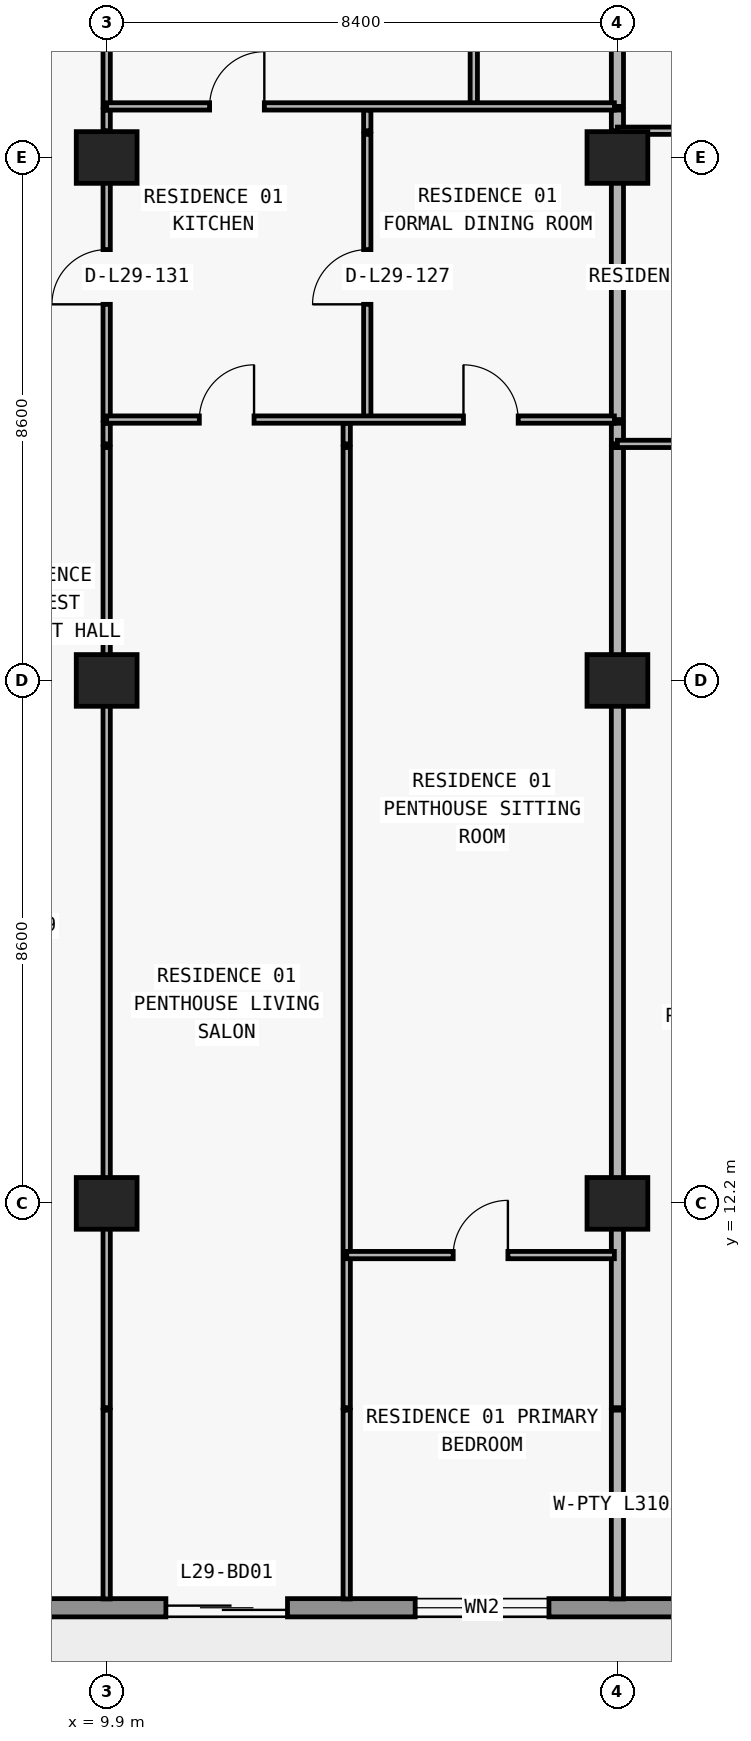
"""IFC4 building model, lengths in metres.
Left out: names, types, materials, properties, quantities, classifications, styles, units other than length and angle.
Written with IfcOpenShell. Run it as: python <this file> out.ifc"""

import sys

from ifc_helpers import new_model, si_unit, direction, frame, frame_2d, origin, origin_2d, place, context, subcontext, project, spatial, rectangle, extrude, element, fill, save


model = new_model("IFC4")
c1 = context("Model", 3, precision=1e-05, world=origin(), true_north=direction((0.0, 1.0)))
c2 = subcontext(c1, "Body", "Model", "MODEL_VIEW")
j1 = project(units=[si_unit("LENGTHUNIT", "METRE"), si_unit("PLANEANGLEUNIT", "RADIAN")], contexts=[c1])
p1 = place(None, origin())
s1 = spatial("IfcSite", under=j1, at=p1, CompositionType="ELEMENT")
p2 = place(p1, origin())
s2 = spatial("IfcBuilding", under=s1, at=p2, CompositionType="ELEMENT")
p3 = place(p2, frame((0.0, 0.0, 109.2)))
s3 = spatial("IfcBuildingStorey", under=s2, at=p3, CompositionType="ELEMENT", Elevation=109.2)
for number, where, z_axis, x_axis in (
    (1, (9.9, 12.2, 0.0), (0.0, 0.0, 1.0), (1.0, 0.0, 0.0)),
    (2, (18.3, 12.2, 0.0), (0.0, 0.0, 1.0), (1.0, 0.0, 0.0)),
    (3, (9.9, 20.8, 0.0), (0.0, 0.0, 1.0), (1.0, 0.0, 0.0)),
    (4, (18.3, 20.8, 0.0), (0.0, 0.0, 1.0), (1.0, 0.0, 0.0)),
    (5, (9.9, 29.4, 0.0), (0.0, 0.0, 1.0), (1.0, 0.0, 0.0)),
    (6, (18.3, 29.4, 0.0), (0.0, 0.0, 1.0), (1.0, 0.0, 0.0)),
):
    element("IfcColumn", number, at=place(p3, frame(where, z_axis=z_axis, x_axis=x_axis)), inside=s3, PredefinedType="COLUMN", context=c2, shape_type="SweptSolid", body=[
        extrude(rectangle(XDim=1.0, YDim=0.85, at=origin_2d()), origin(), (0.0, 0.0, 1.0), 3.05),
    ])
p4 = place(p3, frame((70.1, 5.55, 0.0), z_axis=(0.0, 0.0, 1.0), x_axis=(-1.0, 0.0, 0.0)))
e7 = element("IfcWall", 7, at=p4, inside=s3, PredefinedType="STANDARD", context=c2, shape_type="SweptSolid", body=[
    extrude(rectangle(XDim=62.4, YDim=0.3, at=frame_2d((31.2, 0.0))), origin(), (0.0, 0.0, 1.0), 3.05),
])
p5 = place(p4, frame((57.226, 0.0, 0.0)))
e8 = element("IfcOpeningElement", 8, at=p5, cuts=e7, PredefinedType="OPENING", context=c2, shape_type="SweptSolid", body=[
    extrude(rectangle(XDim=2.0, YDim=2.3, at=frame_2d((1.0, 1.15))), frame((0.0, 0.16, 0.0), z_axis=(0.0, -1.0, 0.0), x_axis=(1.0, 0.0, 0.0)), (0.0, 0.0, 1.0), 0.32),
])
p6 = place(p4, frame((52.926, 0.0, 0.85)))
e9 = element("IfcOpeningElement", 9, at=p6, cuts=e7, PredefinedType="OPENING", context=c2, shape_type="SweptSolid", body=[
    extrude(rectangle(XDim=2.2, YDim=1.55, at=frame_2d((1.1, 0.775))), frame((0.0, 0.16, 0.0), z_axis=(0.0, -1.0, 0.0), x_axis=(1.0, 0.0, 0.0)), (0.0, 0.0, 1.0), 0.32),
])
p7 = place(p4, frame((48.49, 0.0, 0.0)))
e10 = element("IfcOpeningElement", 10, at=p7, cuts=e7, PredefinedType="OPENING", context=c2, shape_type="SweptSolid", body=[
    extrude(rectangle(XDim=2.0, YDim=2.3, at=frame_2d((1.0, 1.15))), frame((0.0, 0.16, 0.0), z_axis=(0.0, -1.0, 0.0), x_axis=(1.0, 0.0, 0.0)), (0.0, 0.0, 1.0), 0.32),
])
p8 = place(p4, frame((44.39, 0.0, 0.85)))
e11 = element("IfcOpeningElement", 11, at=p8, cuts=e7, PredefinedType="OPENING", context=c2, shape_type="SweptSolid", body=[
    extrude(rectangle(XDim=1.8, YDim=1.55, at=frame_2d((0.9, 0.775))), frame((0.0, 0.16, 0.0), z_axis=(0.0, -1.0, 0.0), x_axis=(1.0, 0.0, 0.0)), (0.0, 0.0, 1.0), 0.32),
])
p9 = place(p4, frame((40.49, 0.0, 0.0)))
e12 = element("IfcOpeningElement", 12, at=p9, cuts=e7, PredefinedType="OPENING", context=c2, shape_type="SweptSolid", body=[
    extrude(rectangle(XDim=2.0, YDim=2.3, at=frame_2d((1.0, 1.15))), frame((0.0, 0.16, 0.0), z_axis=(0.0, -1.0, 0.0), x_axis=(1.0, 0.0, 0.0)), (0.0, 0.0, 1.0), 0.32),
])
p10 = place(p4, frame((35.81, 0.0, 0.65)))
e13 = element("IfcOpeningElement", 13, at=p10, cuts=e7, PredefinedType="OPENING", context=c2, shape_type="SweptSolid", body=[
    extrude(rectangle(XDim=2.6, YDim=1.85, at=frame_2d((1.3, 0.925))), frame((0.0, 0.16, 0.0), z_axis=(0.0, -1.0, 0.0), x_axis=(1.0, 0.0, 0.0)), (0.0, 0.0, 1.0), 0.32),
])
p11 = place(p4, frame((30.1, 0.0, 0.85)))
e14 = element("IfcOpeningElement", 14, at=p11, cuts=e7, PredefinedType="OPENING", context=c2, shape_type="SweptSolid", body=[
    extrude(rectangle(XDim=2.2, YDim=1.55, at=frame_2d((1.1, 0.775))), frame((0.0, 0.16, 0.0), z_axis=(0.0, -1.0, 0.0), x_axis=(1.0, 0.0, 0.0)), (0.0, 0.0, 1.0), 0.32),
])
p12 = place(p4, frame((22.1, 0.0, 0.85)))
e15 = element("IfcOpeningElement", 15, at=p12, cuts=e7, PredefinedType="OPENING", context=c2, shape_type="SweptSolid", body=[
    extrude(rectangle(XDim=2.2, YDim=1.55, at=frame_2d((1.1, 0.775))), frame((0.0, 0.16, 0.0), z_axis=(0.0, -1.0, 0.0), x_axis=(1.0, 0.0, 0.0)), (0.0, 0.0, 1.0), 0.32),
])
p13 = place(p4, frame((15.69, 0.0, 0.0)))
e16 = element("IfcOpeningElement", 16, at=p13, cuts=e7, PredefinedType="OPENING", context=c2, shape_type="SweptSolid", body=[
    extrude(rectangle(XDim=2.0, YDim=2.3, at=frame_2d((1.0, 1.15))), frame((0.0, 0.16, 0.0), z_axis=(0.0, -1.0, 0.0), x_axis=(1.0, 0.0, 0.0)), (0.0, 0.0, 1.0), 0.32),
])
p14 = place(p4, frame((11.59, 0.0, 0.85)))
e17 = element("IfcOpeningElement", 17, at=p14, cuts=e7, PredefinedType="OPENING", context=c2, shape_type="SweptSolid", body=[
    extrude(rectangle(XDim=1.8, YDim=1.55, at=frame_2d((0.9, 0.775))), frame((0.0, 0.16, 0.0), z_axis=(0.0, -1.0, 0.0), x_axis=(1.0, 0.0, 0.0)), (0.0, 0.0, 1.0), 0.32),
])
p15 = place(p4, frame((7.626, 0.0, 0.0)))
e18 = element("IfcOpeningElement", 18, at=p15, cuts=e7, PredefinedType="OPENING", context=c2, shape_type="SweptSolid", body=[
    extrude(rectangle(XDim=2.0, YDim=2.3, at=frame_2d((1.0, 1.15))), frame((0.0, 0.16, 0.0), z_axis=(0.0, -1.0, 0.0), x_axis=(1.0, 0.0, 0.0)), (0.0, 0.0, 1.0), 0.32),
])
p16 = place(p4, frame((3.326, 0.0, 0.85)))
e19 = element("IfcOpeningElement", 19, at=p16, cuts=e7, PredefinedType="OPENING", context=c2, shape_type="SweptSolid", body=[
    extrude(rectangle(XDim=2.2, YDim=1.55, at=frame_2d((1.1, 0.775))), frame((0.0, 0.16, 0.0), z_axis=(0.0, -1.0, 0.0), x_axis=(1.0, 0.0, 0.0)), (0.0, 0.0, 1.0), 0.32),
])
p17 = place(p3, frame((9.9, 5.695, 0.0), z_axis=(0.0, 0.0, 1.0), x_axis=(0.0, 1.0, 0.0)))
e20 = element("IfcWall", 20, at=p17, inside=s3, PredefinedType="PARTITIONING", context=c2, shape_type="SweptSolid", body=[
    extrude(rectangle(XDim=3.105, YDim=0.12, at=frame_2d((1.552, 0.0))), origin(), (0.0, 0.0, 1.0), 3.05),
])
p18 = place(p3, frame((9.9, 8.84, 0.0), z_axis=(0.0, 0.0, 1.0), x_axis=(0.0, 1.0, 0.0)))
e21 = element("IfcWall", 21, at=p18, inside=s3, PredefinedType="PARTITIONING", context=c2, shape_type="SweptSolid", body=[
    extrude(rectangle(XDim=15.79, YDim=0.12, at=frame_2d((7.895, 0.0))), origin(), (0.0, 0.0, 1.0), 2.174),
])
p19 = place(p3, frame((9.9, 24.69, 0.0), z_axis=(0.0, 0.0, 1.0), x_axis=(0.0, 1.0, 0.0)))
e22 = element("IfcWall", 22, at=p19, inside=s3, PredefinedType="PARTITIONING", context=c2, shape_type="SweptSolid", body=[
    extrude(rectangle(XDim=0.34, YDim=0.12, at=frame_2d((0.17, 0.0))), origin(), (0.0, 0.0, 1.0), 2.174),
])
p20 = place(p3, frame((9.9, 25.09, 0.0), z_axis=(0.0, 0.0, 1.0), x_axis=(0.0, 1.0, 0.0)))
e23 = element("IfcWall", 23, at=p20, inside=s3, PredefinedType="PARTITIONING", context=c2, shape_type="SweptSolid", body=[
    extrude(rectangle(XDim=4.69, YDim=0.12, at=frame_2d((2.345, 0.0))), origin(), (0.0, 0.0, 1.0), 2.174),
])
p21 = place(p20, frame((1.895, 0.0, 0.0)))
e24 = element("IfcOpeningElement", 24, at=p21, cuts=e23, PredefinedType="OPENING", context=c2, shape_type="SweptSolid", body=[
    extrude(rectangle(XDim=0.9, YDim=2.124, at=frame_2d((0.45, 1.062))), frame((0.0, 0.07, 0.0), z_axis=(0.0, -1.0, 0.0), x_axis=(1.0, 0.0, 0.0)), (0.0, 0.0, 1.0), 0.14),
])
p22 = place(p3, frame((9.9, 29.84, 0.0), z_axis=(0.0, 0.0, 1.0), x_axis=(0.0, 1.0, 0.0)))
e25 = element("IfcWall", 25, at=p22, inside=s3, PredefinedType="PARTITIONING", context=c2, shape_type="SweptSolid", body=[
    extrude(rectangle(XDim=0.34, YDim=0.12, at=frame_2d((0.17, 0.0))), origin(), (0.0, 0.0, 1.0), 2.174),
])
p23 = place(p3, frame((9.9, 30.24, 0.0), z_axis=(0.0, 0.0, 1.0), x_axis=(0.0, 1.0, 0.0)))
e26 = element("IfcWall", 26, at=p23, inside=s3, PredefinedType="PARTITIONING", context=c2, shape_type="SweptSolid", body=[
    extrude(rectangle(XDim=4.36, YDim=0.12, at=frame_2d((2.18, 0.0))), origin(), (0.0, 0.0, 1.0), 2.174),
])
p24 = place(p3, frame((13.848, 5.695, 0.0), z_axis=(0.0, 0.0, 1.0), x_axis=(0.0, 1.0, 0.0)))
e27 = element("IfcWall", 27, at=p24, inside=s3, PredefinedType="PARTITIONING", context=c2, shape_type="SweptSolid", body=[
    extrude(rectangle(XDim=3.105, YDim=0.12, at=frame_2d((1.552, 0.0))), origin(), (0.0, 0.0, 1.0), 3.05),
])
p25 = place(p3, frame((13.848, 8.84, 0.0), z_axis=(0.0, 0.0, 1.0), x_axis=(0.0, 1.0, 0.0)))
e28 = element("IfcWall", 28, at=p25, inside=s3, PredefinedType="PARTITIONING", context=c2, shape_type="SweptSolid", body=[
    extrude(rectangle(XDim=15.79, YDim=0.12, at=frame_2d((7.895, 0.0))), origin(), (0.0, 0.0, 1.0), 3.05),
])
p26 = place(p3, frame((13.848, 24.69, 0.0), z_axis=(0.0, 0.0, 1.0), x_axis=(0.0, 1.0, 0.0)))
e29 = element("IfcWall", 29, at=p26, inside=s3, PredefinedType="PARTITIONING", context=c2, shape_type="SweptSolid", body=[
    extrude(rectangle(XDim=0.34, YDim=0.12, at=frame_2d((0.17, 0.0))), origin(), (0.0, 0.0, 1.0), 3.05),
])
p27 = place(p3, frame((14.186, 25.09, 0.0), z_axis=(0.0, 0.0, 1.0), x_axis=(0.0, 1.0, 0.0)))
e30 = element("IfcWall", 30, at=p27, inside=s3, PredefinedType="PARTITIONING", context=c2, shape_type="SweptSolid", body=[
    extrude(rectangle(XDim=4.69, YDim=0.12, at=frame_2d((2.345, 0.0))), origin(), (0.0, 0.0, 1.0), 2.486),
])
p28 = place(p27, frame((1.895, 0.0, 0.0)))
e31 = element("IfcOpeningElement", 31, at=p28, cuts=e30, PredefinedType="OPENING", context=c2, shape_type="SweptSolid", body=[
    extrude(rectangle(XDim=0.9, YDim=2.15, at=frame_2d((0.45, 1.075))), frame((0.0, 0.07, 0.0), z_axis=(0.0, -1.0, 0.0), x_axis=(1.0, 0.0, 0.0)), (0.0, 0.0, 1.0), 0.14),
])
p29 = place(p3, frame((14.186, 29.84, 0.0), z_axis=(0.0, 0.0, 1.0), x_axis=(0.0, 1.0, 0.0)))
e32 = element("IfcWall", 32, at=p29, inside=s3, PredefinedType="PARTITIONING", context=c2, shape_type="SweptSolid", body=[
    extrude(rectangle(XDim=0.34, YDim=0.12, at=frame_2d((0.17, 0.0))), origin(), (0.0, 0.0, 1.0), 2.486),
])
p30 = place(p3, frame((15.938, 30.24, 0.0), z_axis=(0.0, 0.0, 1.0), x_axis=(0.0, 1.0, 0.0)))
e33 = element("IfcWall", 33, at=p30, inside=s3, PredefinedType="PARTITIONING", context=c2, shape_type="SweptSolid", body=[
    extrude(rectangle(XDim=4.36, YDim=0.12, at=frame_2d((2.18, 0.0))), origin(), (0.0, 0.0, 1.0), 3.05),
])
p31 = place(p30, frame((1.755, 0.0, 0.0)))
e34 = element("IfcOpeningElement", 34, at=p31, cuts=e33, PredefinedType="OPENING", context=c2, shape_type="SweptSolid", body=[
    extrude(rectangle(XDim=0.85, YDim=2.1, at=frame_2d((0.425, 1.05))), frame((0.0, 0.07, 0.0), z_axis=(0.0, -1.0, 0.0), x_axis=(1.0, 0.0, 0.0)), (0.0, 0.0, 1.0), 0.14),
])
p32 = place(p3, frame((18.3, 5.695, 0.0), z_axis=(0.0, 0.0, 1.0), x_axis=(0.0, 1.0, 0.0)))
e35 = element("IfcWall", 35, at=p32, inside=s3, PredefinedType="PARTITIONING", context=c2, shape_type="SweptSolid", body=[
    extrude(rectangle(XDim=3.105, YDim=0.2, at=frame_2d((1.552, 0.0))), origin(), (0.0, 0.0, 1.0), 3.05),
])
p33 = place(p3, frame((18.3, 8.84, 0.0), z_axis=(0.0, 0.0, 1.0), x_axis=(0.0, 1.0, 0.0)))
e36 = element("IfcWall", 36, at=p33, inside=s3, PredefinedType="PARTITIONING", context=c2, shape_type="SweptSolid", body=[
    extrude(rectangle(XDim=15.79, YDim=0.2, at=frame_2d((7.895, 0.0))), origin(), (0.0, 0.0, 1.0), 2.174),
])
p34 = place(p3, frame((18.3, 24.69, 0.0), z_axis=(0.0, 0.0, 1.0), x_axis=(0.0, 1.0, 0.0)))
e37 = element("IfcWall", 37, at=p34, inside=s3, PredefinedType="PARTITIONING", context=c2, shape_type="SweptSolid", body=[
    extrude(rectangle(XDim=0.34, YDim=0.2, at=frame_2d((0.17, 0.0))), origin(), (0.0, 0.0, 1.0), 2.174),
])
p35 = place(p3, frame((18.3, 25.09, 0.0), z_axis=(0.0, 0.0, 1.0), x_axis=(0.0, 1.0, 0.0)))
e38 = element("IfcWall", 38, at=p35, inside=s3, PredefinedType="PARTITIONING", context=c2, shape_type="SweptSolid", body=[
    extrude(rectangle(XDim=4.69, YDim=0.2, at=frame_2d((2.345, 0.0))), origin(), (0.0, 0.0, 1.0), 2.174),
])
p36 = place(p3, frame((18.3, 29.84, 0.0), z_axis=(0.0, 0.0, 1.0), x_axis=(0.0, 1.0, 0.0)))
e39 = element("IfcWall", 39, at=p36, inside=s3, PredefinedType="PARTITIONING", context=c2, shape_type="SweptSolid", body=[
    extrude(rectangle(XDim=0.34, YDim=0.2, at=frame_2d((0.17, 0.0))), origin(), (0.0, 0.0, 1.0), 2.174),
])
p37 = place(p3, frame((18.3, 30.24, 0.0), z_axis=(0.0, 0.0, 1.0), x_axis=(0.0, 1.0, 0.0)))
e40 = element("IfcWall", 40, at=p37, inside=s3, PredefinedType="PARTITIONING", context=c2, shape_type="SweptSolid", body=[
    extrude(rectangle(XDim=4.36, YDim=0.2, at=frame_2d((2.18, 0.0))), origin(), (0.0, 0.0, 1.0), 2.174),
])
p38 = place(p3, frame((13.848, 11.35, 0.0), z_axis=(0.0, 0.0, 1.0), x_axis=(1.0, 0.0, 0.0)))
e41 = element("IfcWall", 41, at=p38, inside=s3, PredefinedType="PARTITIONING", context=c2, shape_type="SweptSolid", body=[
    extrude(rectangle(XDim=4.402, YDim=0.12, at=frame_2d((2.201, 0.0))), origin(), (0.0, 0.0, 1.0), 3.05),
])
p39 = place(p38, frame((1.751, 0.0, 0.0)))
e42 = element("IfcOpeningElement", 42, at=p39, cuts=e41, PredefinedType="OPENING", context=c2, shape_type="SweptSolid", body=[
    extrude(rectangle(XDim=0.9, YDim=2.15, at=frame_2d((0.45, 1.075))), frame((0.0, 0.07, 0.0), z_axis=(0.0, -1.0, 0.0), x_axis=(1.0, 0.0, 0.0)), (0.0, 0.0, 1.0), 0.14),
])
p40 = place(p3, frame((18.3, 24.69, 0.0), z_axis=(0.0, 0.0, 1.0), x_axis=(1.0, 0.0, 0.0)))
e43 = element("IfcWall", 43, at=p40, inside=s3, PredefinedType="PARTITIONING", context=c2, shape_type="SweptSolid", body=[
    extrude(rectangle(XDim=8.18, YDim=0.12, at=frame_2d((4.09, 0.0))), origin(), (0.0, 0.0, 1.0), 3.05),
])
p41 = place(p40, frame((1.818, 0.0, 0.0)))
e44 = element("IfcOpeningElement", 44, at=p41, cuts=e43, PredefinedType="OPENING", context=c2, shape_type="SweptSolid", body=[
    extrude(rectangle(XDim=0.9, YDim=2.15, at=frame_2d((0.45, 1.075))), frame((0.0, 0.07, 0.0), z_axis=(0.0, -1.0, 0.0), x_axis=(1.0, 0.0, 0.0)), (0.0, 0.0, 1.0), 0.14),
])
p42 = place(p40, frame((5.95, 0.0, 0.0)))
e45 = element("IfcOpeningElement", 45, at=p42, cuts=e43, PredefinedType="OPENING", context=c2, shape_type="SweptSolid", body=[
    extrude(rectangle(XDim=0.9, YDim=2.15, at=frame_2d((0.45, 1.075))), frame((0.0, 0.07, 0.0), z_axis=(0.0, -1.0, 0.0), x_axis=(1.0, 0.0, 0.0)), (0.0, 0.0, 1.0), 0.14),
])
p43 = place(p3, frame((9.9, 25.09, 0.0), z_axis=(0.0, 0.0, 1.0), x_axis=(1.0, 0.0, 0.0)))
e46 = element("IfcWall", 46, at=p43, inside=s3, PredefinedType="PARTITIONING", context=c2, shape_type="SweptSolid", body=[
    extrude(rectangle(XDim=8.35, YDim=0.12, at=frame_2d((4.175, 0.0))), origin(), (0.0, 0.0, 1.0), 3.05),
])
p44 = place(p43, frame((1.524, 0.0, 0.0)))
e47 = element("IfcOpeningElement", 47, at=p44, cuts=e46, PredefinedType="OPENING", context=c2, shape_type="SweptSolid", body=[
    extrude(rectangle(XDim=0.9, YDim=2.15, at=frame_2d((0.45, 1.075))), frame((0.0, 0.07, 0.0), z_axis=(0.0, -1.0, 0.0), x_axis=(1.0, 0.0, 0.0)), (0.0, 0.0, 1.0), 0.14),
])
p45 = place(p43, frame((5.868, 0.0, 0.0)))
e48 = element("IfcOpeningElement", 48, at=p45, cuts=e46, PredefinedType="OPENING", context=c2, shape_type="SweptSolid", body=[
    extrude(rectangle(XDim=0.9, YDim=2.15, at=frame_2d((0.45, 1.075))), frame((0.0, 0.07, 0.0), z_axis=(0.0, -1.0, 0.0), x_axis=(1.0, 0.0, 0.0)), (0.0, 0.0, 1.0), 0.14),
])
p46 = place(p3, frame((18.3, 29.84, 0.0), z_axis=(0.0, 0.0, 1.0), x_axis=(1.0, 0.0, 0.0)))
e49 = element("IfcWall", 49, at=p46, inside=s3, PredefinedType="PARTITIONING", context=c2, shape_type="SweptSolid", body=[
    extrude(rectangle(XDim=8.35, YDim=0.12, at=frame_2d((4.175, 0.0))), origin(), (0.0, 0.0, 1.0), 3.05),
])
p47 = place(p46, frame((1.818, 0.0, 0.0)))
e50 = element("IfcOpeningElement", 50, at=p47, cuts=e49, PredefinedType="OPENING", context=c2, shape_type="SweptSolid", body=[
    extrude(rectangle(XDim=0.9, YDim=2.15, at=frame_2d((0.45, 1.075))), frame((0.0, 0.07, 0.0), z_axis=(0.0, -1.0, 0.0), x_axis=(1.0, 0.0, 0.0)), (0.0, 0.0, 1.0), 0.14),
])
p48 = place(p3, frame((9.9, 30.24, 0.0), z_axis=(0.0, 0.0, 1.0), x_axis=(1.0, 0.0, 0.0)))
e51 = element("IfcWall", 51, at=p48, inside=s3, PredefinedType="PARTITIONING", context=c2, shape_type="SweptSolid", body=[
    extrude(rectangle(XDim=8.35, YDim=0.12, at=frame_2d((4.175, 0.0))), origin(), (0.0, 0.0, 1.0), 3.05),
])
p49 = place(p48, frame((1.693, 0.0, 0.0)))
e52 = element("IfcOpeningElement", 52, at=p49, cuts=e51, PredefinedType="OPENING", context=c2, shape_type="SweptSolid", body=[
    extrude(rectangle(XDim=0.9, YDim=2.15, at=frame_2d((0.45, 1.075))), frame((0.0, 0.07, 0.0), z_axis=(0.0, -1.0, 0.0), x_axis=(1.0, 0.0, 0.0)), (0.0, 0.0, 1.0), 0.14),
])
p50 = place(p5, origin())
e53 = element("IfcDoor", 53, at=p50, inside=s3, OperationType="DOUBLE_DOOR_SLIDING", PredefinedType="DOOR", context=c2, shape_type="SweptSolid", body=[
    extrude(rectangle(XDim=2.0, YDim=2.3, at=frame_2d((1.0, 1.15))), frame((0.0, 0.025, 0.0), z_axis=(0.0, -1.0, 0.0), x_axis=(1.0, 0.0, 0.0)), (0.0, 0.0, 1.0), 0.05),
])
fill(e8, e53)
p51 = place(p6, origin())
e54 = element("IfcWindow", 54, at=p51, inside=s3, PartitioningType="SINGLE_PANEL", PredefinedType="WINDOW", context=c2, shape_type="SweptSolid", body=[
    extrude(rectangle(XDim=2.2, YDim=1.55, at=frame_2d((1.1, 0.775))), frame((0.0, 0.03, 0.0), z_axis=(0.0, -1.0, 0.0), x_axis=(1.0, 0.0, 0.0)), (0.0, 0.0, 1.0), 0.06),
])
fill(e9, e54)
p52 = place(p49, origin())
e55 = element("IfcDoor", 55, at=p52, inside=s3, OperationType="SINGLE_SWING_RIGHT", PredefinedType="DOOR", context=c2, shape_type="SweptSolid", body=[
    extrude(rectangle(XDim=0.9, YDim=2.15, at=frame_2d((0.45, 1.075))), frame((0.0, 0.025, 0.0), z_axis=(0.0, -1.0, 0.0), x_axis=(1.0, 0.0, 0.0)), (0.0, 0.0, 1.0), 0.05),
])
fill(e52, e55)
p53 = place(p28, origin())
e56 = element("IfcDoor", 56, at=p53, inside=s3, OperationType="SINGLE_SWING_LEFT", PredefinedType="DOOR", context=c2, shape_type="SweptSolid", body=[
    extrude(rectangle(XDim=0.9, YDim=2.15, at=frame_2d((0.45, 1.075))), frame((0.0, 0.025, 0.0), z_axis=(0.0, -1.0, 0.0), x_axis=(1.0, 0.0, 0.0)), (0.0, 0.0, 1.0), 0.05),
])
fill(e31, e56)
p54 = place(p44, origin())
e57 = element("IfcDoor", 57, at=p54, inside=s3, OperationType="SINGLE_SWING_RIGHT", PredefinedType="DOOR", context=c2, shape_type="SweptSolid", body=[
    extrude(rectangle(XDim=0.9, YDim=2.15, at=frame_2d((0.45, 1.075))), frame((0.0, 0.025, 0.0), z_axis=(0.0, -1.0, 0.0), x_axis=(1.0, 0.0, 0.0)), (0.0, 0.0, 1.0), 0.05),
])
fill(e47, e57)
p55 = place(p45, origin())
e58 = element("IfcDoor", 58, at=p55, inside=s3, OperationType="SINGLE_SWING_LEFT", PredefinedType="DOOR", context=c2, shape_type="SweptSolid", body=[
    extrude(rectangle(XDim=0.9, YDim=2.15, at=frame_2d((0.45, 1.075))), frame((0.0, 0.025, 0.0), z_axis=(0.0, -1.0, 0.0), x_axis=(1.0, 0.0, 0.0)), (0.0, 0.0, 1.0), 0.05),
])
fill(e48, e58)
p56 = place(p39, origin())
e59 = element("IfcDoor", 59, at=p56, inside=s3, OperationType="SINGLE_SWING_RIGHT", PredefinedType="DOOR", context=c2, shape_type="SweptSolid", body=[
    extrude(rectangle(XDim=0.9, YDim=2.15, at=frame_2d((0.45, 1.075))), frame((0.0, 0.025, 0.0), z_axis=(0.0, -1.0, 0.0), x_axis=(1.0, 0.0, 0.0)), (0.0, 0.0, 1.0), 0.05),
])
fill(e42, e59)
p57 = place(p21, origin())
e60 = element("IfcDoor", 60, at=p57, inside=s3, OperationType="SINGLE_SWING_LEFT", PredefinedType="DOOR", context=c2, shape_type="SweptSolid", body=[
    extrude(rectangle(XDim=0.9, YDim=2.124, at=frame_2d((0.45, 1.062))), frame((0.0, 0.025, 0.0), z_axis=(0.0, -1.0, 0.0), x_axis=(1.0, 0.0, 0.0)), (0.0, 0.0, 1.0), 0.05),
])
fill(e24, e60)
save(model, sys.argv[1])
